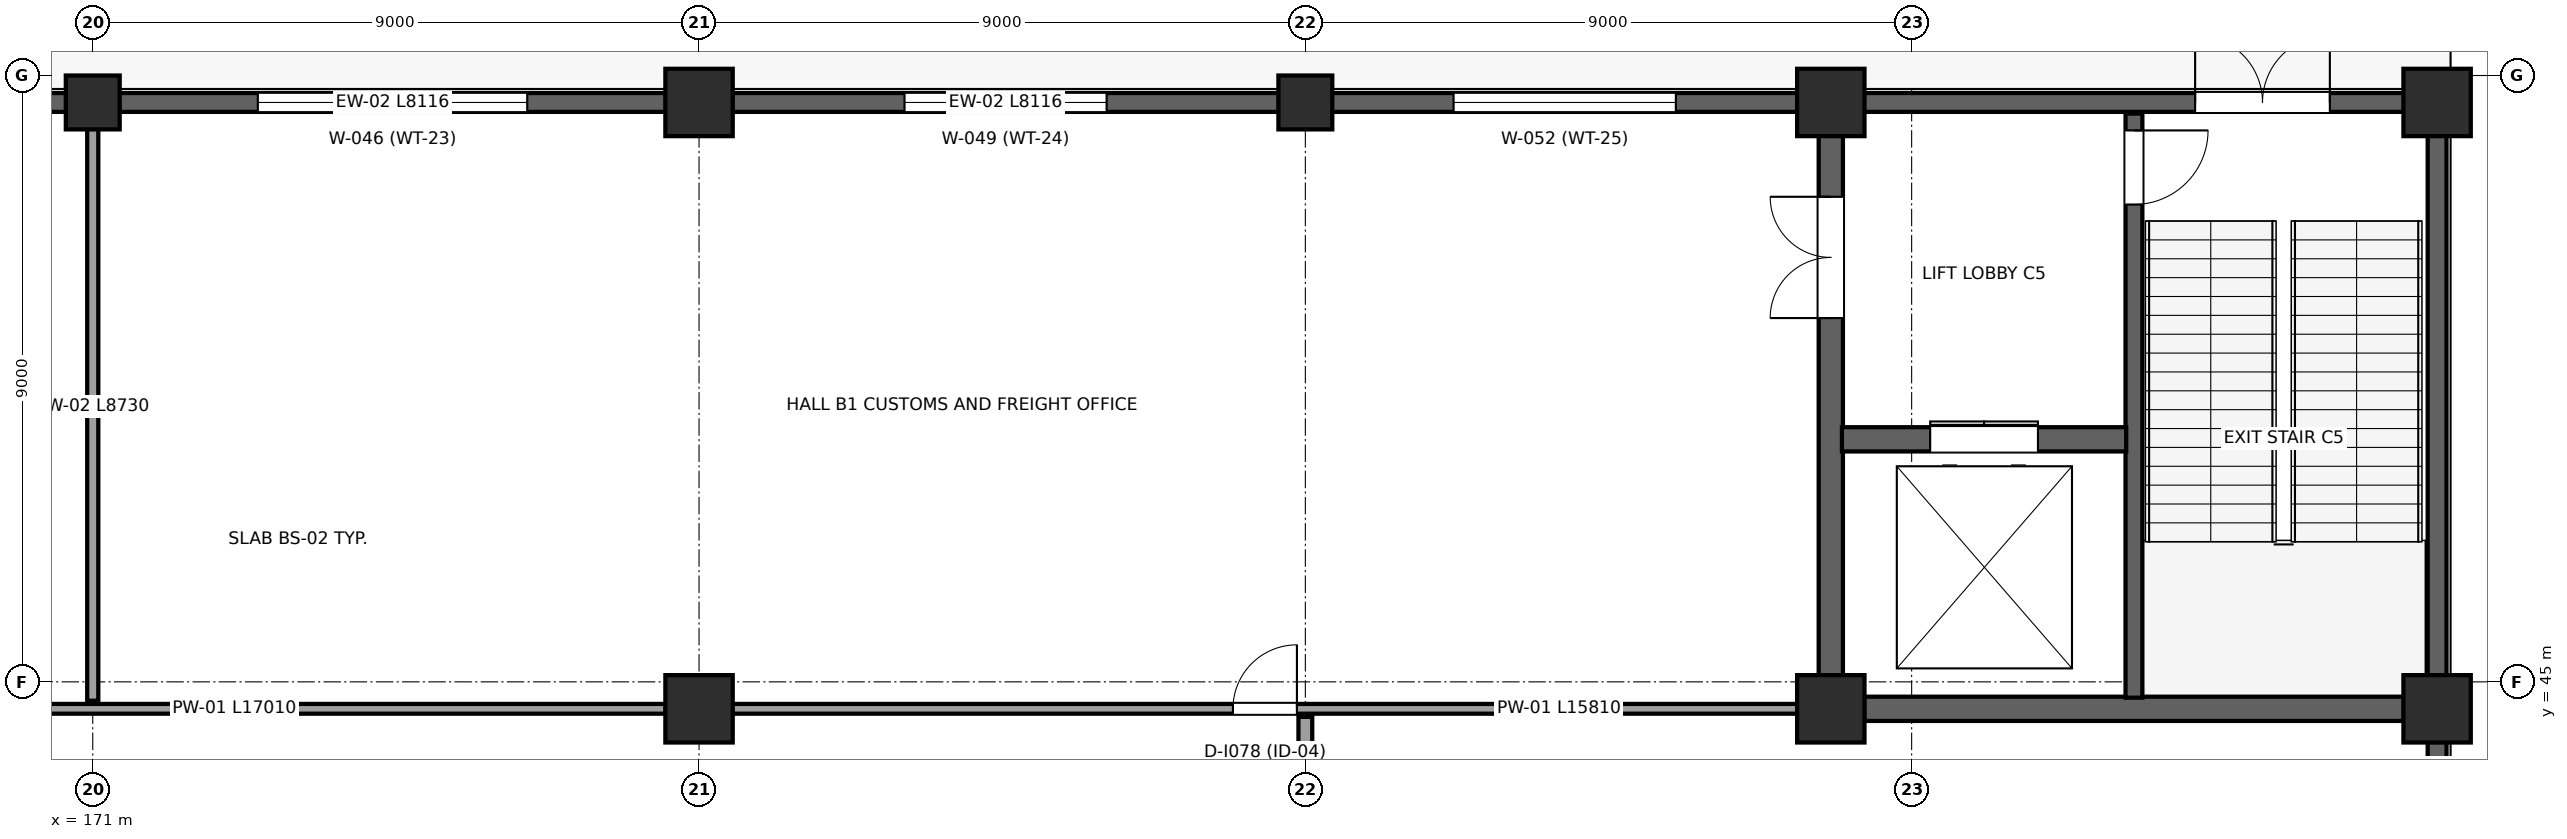
"""IFC4 building model, lengths in metres.
Left out: names, types, materials, properties, quantities, classifications, styles, units other than length and angle.
Written with IfcOpenShell. Run it as: python <this file> out.ifc"""

import sys

from ifc_helpers import new_model, si_unit, direction, frame, frame_2d, origin, origin_2d, place, context, subcontext, project, spatial, rectangle, extrude, element, fill, save


model = new_model("IFC4")
c1 = context("Model", 3, precision=1e-05, world=origin(), true_north=direction((0.0, 1.0)))
c2 = subcontext(c1, "Body", "Model", "MODEL_VIEW")
j1 = project(units=[si_unit("LENGTHUNIT", "METRE"), si_unit("PLANEANGLEUNIT", "RADIAN")], contexts=[c1])
p1 = place(None, origin())
s1 = spatial("IfcSite", under=j1, at=p1, CompositionType="ELEMENT")
p2 = place(p1, origin())
s2 = spatial("IfcBuilding", under=s1, at=p2, CompositionType="ELEMENT")
p3 = place(p2, origin())
s3 = spatial("IfcBuildingStorey", under=s2, at=p3, CompositionType="ELEMENT", Elevation=0.0)
for number, where, z_axis, x_axis in (
    (1, (180.0, 44.6, 0.0), (0.0, 0.0, 1.0), (1.0, 0.0, 0.0)),
    (2, (180.0, 53.6, 0.0), (0.0, 0.0, 1.0), (1.0, 0.0, 0.0)),
    (3, (196.8, 44.6, 0.0), (0.0, 0.0, 1.0), (1.0, 0.0, 0.0)),
    (4, (196.8, 53.6, 0.0), (0.0, 0.0, 1.0), (1.0, 0.0, 0.0)),
    (5, (205.8, 44.6, 0.0), (0.0, 0.0, 1.0), (1.0, 0.0, 0.0)),
    (6, (205.8, 53.6, 0.0), (0.0, 0.0, 1.0), (1.0, 0.0, 0.0)),
):
    element("IfcColumn", number, at=place(p3, frame(where, z_axis=z_axis, x_axis=x_axis)), inside=s3, PredefinedType="COLUMN", context=c2, shape_type="SweptSolid", body=[
        extrude(rectangle(XDim=1.0, YDim=1.0, at=origin_2d()), origin(), (0.0, 0.0, 1.0), 6.0),
    ])
for number, where, z_axis, x_axis in (
    (7, (171.0, 53.6, 0.0), (0.0, 0.0, 1.0), (1.0, 0.0, 0.0)),
    (8, (189.0, 53.6, 0.0), (0.0, 0.0, 1.0), (1.0, 0.0, 0.0)),
):
    element("IfcColumn", number, at=place(p3, frame(where, z_axis=z_axis, x_axis=x_axis)), inside=s3, PredefinedType="COLUMN", context=c2, shape_type="SweptSolid", body=[
        extrude(rectangle(XDim=0.8, YDim=0.8, at=origin_2d()), origin(), (0.0, 0.0, 1.0), 6.0),
    ])
p4 = place(p3, frame((162.492, 53.6, 0.0), z_axis=(0.0, 0.0, 1.0), x_axis=(1.0, 0.0, 0.0)))
e9 = element("IfcWall", 9, at=p4, inside=s3, PredefinedType="STANDARD", context=c2, shape_type="SweptSolid", body=[
    extrude(rectangle(XDim=8.116, YDim=0.28, at=frame_2d((4.058, 0.0))), origin(), (0.0, 0.0, 1.0), 5.75),
])
p5 = place(p4, frame((2.858, 0.0, 0.0)))
e10 = element("IfcOpeningElement", 10, at=p5, cuts=e9, PredefinedType="OPENING", context=c2, shape_type="SweptSolid", body=[
    extrude(rectangle(XDim=2.4, YDim=2.6, at=frame_2d((1.2, 1.3))), frame((0.0, 0.15, 0.0), z_axis=(0.0, -1.0, 0.0), x_axis=(1.0, 0.0, 0.0)), (0.0, 0.0, 1.0), 0.3),
])
p6 = place(p3, frame((171.392, 53.6, 0.0), z_axis=(0.0, 0.0, 1.0), x_axis=(1.0, 0.0, 0.0)))
e11 = element("IfcWall", 11, at=p6, inside=s3, PredefinedType="STANDARD", context=c2, shape_type="SweptSolid", body=[
    extrude(rectangle(XDim=8.116, YDim=0.28, at=frame_2d((4.058, 0.0))), origin(), (0.0, 0.0, 1.0), 5.75),
])
p7 = place(p6, frame((2.058, 0.0, 2.6)))
e12 = element("IfcOpeningElement", 12, at=p7, cuts=e11, PredefinedType="OPENING", context=c2, shape_type="SweptSolid", body=[
    extrude(rectangle(XDim=4.0, YDim=1.25, at=frame_2d((2.0, 0.625))), frame((0.0, 0.15, 0.0), z_axis=(0.0, -1.0, 0.0), x_axis=(1.0, 0.0, 0.0)), (0.0, 0.0, 1.0), 0.3),
])
p8 = place(p3, frame((180.492, 53.6, 0.0), z_axis=(0.0, 0.0, 1.0), x_axis=(1.0, 0.0, 0.0)))
e13 = element("IfcWall", 13, at=p8, inside=s3, PredefinedType="STANDARD", context=c2, shape_type="SweptSolid", body=[
    extrude(rectangle(XDim=8.116, YDim=0.28, at=frame_2d((4.058, 0.0))), origin(), (0.0, 0.0, 1.0), 5.75),
])
p9 = place(p8, frame((2.558, 0.0, 2.6)))
e14 = element("IfcOpeningElement", 14, at=p9, cuts=e13, PredefinedType="OPENING", context=c2, shape_type="SweptSolid", body=[
    extrude(rectangle(XDim=3.0, YDim=1.45, at=frame_2d((1.5, 0.725))), frame((0.0, 0.15, 0.0), z_axis=(0.0, -1.0, 0.0), x_axis=(1.0, 0.0, 0.0)), (0.0, 0.0, 1.0), 0.3),
])
p10 = place(p3, frame((189.392, 53.6, 0.0), z_axis=(0.0, 0.0, 1.0), x_axis=(1.0, 0.0, 0.0)))
e15 = element("IfcWall", 15, at=p10, inside=s3, PredefinedType="STANDARD", context=c2, shape_type="SweptSolid", body=[
    extrude(rectangle(XDim=6.916, YDim=0.28, at=frame_2d((3.458, 0.0))), origin(), (0.0, 0.0, 1.0), 5.75),
])
p11 = place(p10, frame((1.808, 0.0, 2.6)))
e16 = element("IfcOpeningElement", 16, at=p11, cuts=e15, PredefinedType="OPENING", context=c2, shape_type="SweptSolid", body=[
    extrude(rectangle(XDim=3.3, YDim=1.45, at=frame_2d((1.65, 0.725))), frame((0.0, 0.15, 0.0), z_axis=(0.0, -1.0, 0.0), x_axis=(1.0, 0.0, 0.0)), (0.0, 0.0, 1.0), 0.3),
])
p12 = place(p3, frame((197.292, 53.6, 0.0), z_axis=(0.0, 0.0, 1.0), x_axis=(1.0, 0.0, 0.0)))
e17 = element("IfcWall", 17, at=p12, inside=s3, PredefinedType="STANDARD", context=c2, shape_type="SweptSolid", body=[
    extrude(rectangle(XDim=8.016, YDim=0.28, at=frame_2d((4.008, 0.0))), origin(), (0.0, 0.0, 1.0), 5.75),
])
p13 = place(p12, frame((4.916, 0.0, 0.0)))
e18 = element("IfcOpeningElement", 18, at=p13, cuts=e17, PredefinedType="OPENING", context=c2, shape_type="SweptSolid", body=[
    extrude(rectangle(XDim=2.0, YDim=2.4, at=frame_2d((1.0, 1.2))), frame((0.0, 0.15, 0.0), z_axis=(0.0, -1.0, 0.0), x_axis=(1.0, 0.0, 0.0)), (0.0, 0.0, 1.0), 0.3),
])
p14 = place(p3, frame((205.8, 44.108, 0.0), z_axis=(0.0, 0.0, 1.0), x_axis=(0.0, -1.0, 0.0)))
e19 = element("IfcWall", 19, at=p14, inside=s3, PredefinedType="STANDARD", context=c2, shape_type="SweptSolid", body=[
    extrude(rectangle(XDim=7.616, YDim=0.28, at=frame_2d((3.808, 0.0))), origin(), (0.0, 0.0, 1.0), 5.75),
])
p15 = place(p14, frame((1.108, 0.0, 0.0)))
e20 = element("IfcOpeningElement", 20, at=p15, cuts=e19, PredefinedType="OPENING", context=c2, shape_type="SweptSolid", body=[
    extrude(rectangle(XDim=5.4, YDim=4.8, at=frame_2d((2.7, 2.4))), frame((0.0, 0.15, 0.0), z_axis=(0.0, -1.0, 0.0), x_axis=(1.0, 0.0, 0.0)), (0.0, 0.0, 1.0), 0.3),
])
p16 = place(p3, frame((205.8, 53.108, 0.0), z_axis=(0.0, 0.0, 1.0), x_axis=(0.0, -1.0, 0.0)))
e21 = element("IfcWall", 21, at=p16, inside=s3, PredefinedType="STANDARD", context=c2, shape_type="SweptSolid", body=[
    extrude(rectangle(XDim=8.016, YDim=0.28, at=frame_2d((4.008, 0.0))), origin(), (0.0, 0.0, 1.0), 5.75),
])
p17 = place(p3, frame((196.8, 45.095, 0.0), z_axis=(0.0, 0.0, 1.0), x_axis=(0.0, 1.0, 0.0)))
e22 = element("IfcWall", 22, at=p17, inside=s3, PredefinedType="SHEAR", context=c2, shape_type="SweptSolid", body=[
    extrude(rectangle(XDim=8.01, YDim=0.36, at=frame_2d((4.005, 0.0))), origin(), (0.0, 0.0, 1.0), 5.75),
])
p18 = place(p17, frame((5.305, 0.0, 0.0)))
e23 = element("IfcOpeningElement", 23, at=p18, cuts=e22, PredefinedType="OPENING", context=c2, shape_type="SweptSolid", body=[
    extrude(rectangle(XDim=1.8, YDim=2.3, at=frame_2d((0.9, 1.15))), frame((0.0, 0.19, 0.0), z_axis=(0.0, -1.0, 0.0), x_axis=(1.0, 0.0, 0.0)), (0.0, 0.0, 1.0), 0.38),
])
p19 = place(p3, frame((197.295, 44.6, 0.0), z_axis=(0.0, 0.0, 1.0), x_axis=(1.0, 0.0, 0.0)))
e24 = element("IfcWall", 24, at=p19, inside=s3, PredefinedType="SHEAR", context=c2, shape_type="SweptSolid", body=[
    extrude(rectangle(XDim=8.01, YDim=0.36, at=frame_2d((4.005, 0.0))), origin(), (0.0, 0.0, 1.0), 5.75),
])
p20 = place(p3, frame((201.3, 53.435, 0.0), z_axis=(0.0, 0.0, 1.0), x_axis=(0.0, -1.0, 0.0)))
e25 = element("IfcWall", 25, at=p20, inside=s3, PredefinedType="SHEAR", context=c2, shape_type="SweptSolid", body=[
    extrude(rectangle(XDim=8.67, YDim=0.25, at=frame_2d((4.335, 0.0))), origin(), (0.0, 0.0, 1.0), 5.75),
])
p21 = place(p20, frame((0.25, 0.0, 0.0)))
e26 = element("IfcOpeningElement", 26, at=p21, cuts=e25, PredefinedType="OPENING", context=c2, shape_type="SweptSolid", body=[
    extrude(rectangle(XDim=1.1, YDim=2.2, at=frame_2d((0.55, 1.1))), frame((0.0, 0.135, 0.0), z_axis=(0.0, -1.0, 0.0), x_axis=(1.0, 0.0, 0.0)), (0.0, 0.0, 1.0), 0.27),
])
p22 = place(p3, frame((196.965, 48.6, 0.0), z_axis=(0.0, 0.0, 1.0), x_axis=(1.0, 0.0, 0.0)))
e27 = element("IfcWall", 27, at=p22, inside=s3, PredefinedType="SHEAR", context=c2, shape_type="SweptSolid", body=[
    extrude(rectangle(XDim=4.22, YDim=0.36, at=frame_2d((2.11, 0.0))), origin(), (0.0, 0.0, 1.0), 5.75),
])
p23 = place(p22, frame((1.31, 0.0, 0.0)))
e28 = element("IfcOpeningElement", 28, at=p23, cuts=e27, PredefinedType="OPENING", context=c2, shape_type="SweptSolid", body=[
    extrude(rectangle(XDim=1.6, YDim=2.4, at=frame_2d((0.8, 1.2))), frame((0.0, 0.19, 0.0), z_axis=(0.0, -1.0, 0.0), x_axis=(1.0, 0.0, 0.0)), (0.0, 0.0, 1.0), 0.38),
])
p24 = place(p3, frame((189.0, 36.15, 0.0), z_axis=(0.0, 0.0, 1.0), x_axis=(0.0, 1.0, 0.0)))
e29 = element("IfcWall", 29, at=p24, inside=s3, PredefinedType="PARTITIONING", context=c2, shape_type="SweptSolid", body=[
    extrude(rectangle(XDim=8.33, YDim=0.205, at=frame_2d((4.165, 0.0))), origin(), (0.0, 0.0, 1.0), 4.65),
])
p25 = place(p3, frame((162.495, 44.6, 0.0), z_axis=(0.0, 0.0, 1.0), x_axis=(1.0, 0.0, 0.0)))
e30 = element("IfcWall", 30, at=p25, inside=s3, PredefinedType="PARTITIONING", context=c2, shape_type="SweptSolid", body=[
    extrude(rectangle(XDim=17.01, YDim=0.145, at=frame_2d((8.505, 0.0))), origin(), (0.0, 0.0, 1.0), 4.65),
])
p26 = place(p25, frame((2.8, 0.0, 0.0)))
e31 = element("IfcOpeningElement", 31, at=p26, cuts=e30, PredefinedType="OPENING", context=c2, shape_type="SweptSolid", body=[
    extrude(rectangle(XDim=1.05, YDim=2.18, at=frame_2d((0.525, 1.09))), frame((0.0, 0.083, 0.0), z_axis=(0.0, -1.0, 0.0), x_axis=(1.0, 0.0, 0.0)), (0.0, 0.0, 1.0), 0.165),
])
p27 = place(p3, frame((180.495, 44.6, 0.0), z_axis=(0.0, 0.0, 1.0), x_axis=(1.0, 0.0, 0.0)))
e32 = element("IfcWall", 32, at=p27, inside=s3, PredefinedType="PARTITIONING", context=c2, shape_type="SweptSolid", body=[
    extrude(rectangle(XDim=15.81, YDim=0.145, at=frame_2d((7.905, 0.0))), origin(), (0.0, 0.0, 1.0), 4.65),
])
p28 = place(p27, frame((7.43, 0.0, 0.0)))
e33 = element("IfcOpeningElement", 33, at=p28, cuts=e32, PredefinedType="OPENING", context=c2, shape_type="SweptSolid", body=[
    extrude(rectangle(XDim=0.95, YDim=2.12, at=frame_2d((0.475, 1.06))), frame((0.0, 0.083, 0.0), z_axis=(0.0, -1.0, 0.0), x_axis=(1.0, 0.0, 0.0)), (0.0, 0.0, 1.0), 0.165),
])
p29 = place(p3, frame((171.0, 44.72, 0.0), z_axis=(0.0, 0.0, 1.0), x_axis=(0.0, 1.0, 0.0)))
e34 = element("IfcWall", 34, at=p29, inside=s3, PredefinedType="PARTITIONING", context=c2, shape_type="SweptSolid", body=[
    extrude(rectangle(XDim=8.73, YDim=0.165, at=frame_2d((4.365, 0.0))), origin(), (0.0, 0.0, 1.0), 4.65),
])
p30 = place(p7, origin())
e35 = element("IfcWindow", 35, at=p30, inside=s3, PartitioningType="SINGLE_PANEL", PredefinedType="WINDOW", context=c2, shape_type="SweptSolid", body=[
    extrude(rectangle(XDim=4.0, YDim=1.25, at=frame_2d((2.0, 0.625))), frame((0.0, 0.03, 0.0), z_axis=(0.0, -1.0, 0.0), x_axis=(1.0, 0.0, 0.0)), (0.0, 0.0, 1.0), 0.06),
])
fill(e12, e35)
p31 = place(p9, origin())
e36 = element("IfcWindow", 36, at=p31, inside=s3, PartitioningType="SINGLE_PANEL", PredefinedType="WINDOW", context=c2, shape_type="SweptSolid", body=[
    extrude(rectangle(XDim=3.0, YDim=1.45, at=frame_2d((1.5, 0.725))), frame((0.0, 0.03, 0.0), z_axis=(0.0, -1.0, 0.0), x_axis=(1.0, 0.0, 0.0)), (0.0, 0.0, 1.0), 0.06),
])
fill(e14, e36)
p32 = place(p11, origin())
e37 = element("IfcWindow", 37, at=p32, inside=s3, PartitioningType="SINGLE_PANEL", PredefinedType="WINDOW", context=c2, shape_type="SweptSolid", body=[
    extrude(rectangle(XDim=3.3, YDim=1.45, at=frame_2d((1.65, 0.725))), frame((0.0, 0.03, 0.0), z_axis=(0.0, -1.0, 0.0), x_axis=(1.0, 0.0, 0.0)), (0.0, 0.0, 1.0), 0.06),
])
fill(e16, e37)
p33 = place(p13, origin())
e38 = element("IfcDoor", 38, at=p33, inside=s3, OperationType="DOUBLE_DOOR_SINGLE_SWING", PredefinedType="DOOR", context=c2, shape_type="SweptSolid", body=[
    extrude(rectangle(XDim=2.0, YDim=2.4, at=frame_2d((1.0, 1.2))), frame((0.0, 0.025, 0.0), z_axis=(0.0, -1.0, 0.0), x_axis=(1.0, 0.0, 0.0)), (0.0, 0.0, 1.0), 0.05),
])
fill(e18, e38)
p34 = place(p21, origin())
e39 = element("IfcDoor", 39, at=p34, inside=s3, OperationType="SINGLE_SWING_LEFT", PredefinedType="DOOR", context=c2, shape_type="SweptSolid", body=[
    extrude(rectangle(XDim=1.1, YDim=2.2, at=frame_2d((0.55, 1.1))), frame((0.0, 0.025, 0.0), z_axis=(0.0, -1.0, 0.0), x_axis=(1.0, 0.0, 0.0)), (0.0, 0.0, 1.0), 0.05),
])
fill(e26, e39)
p35 = place(p23, origin())
e40 = element("IfcDoor", 40, at=p35, inside=s3, OperationType="DOUBLE_DOOR_SLIDING", PredefinedType="DOOR", context=c2, shape_type="SweptSolid", body=[
    extrude(rectangle(XDim=1.6, YDim=2.4, at=frame_2d((0.8, 1.2))), frame((0.0, 0.025, 0.0), z_axis=(0.0, -1.0, 0.0), x_axis=(1.0, 0.0, 0.0)), (0.0, 0.0, 1.0), 0.05),
])
fill(e28, e40)
p36 = place(p18, origin())
e41 = element("IfcDoor", 41, at=p36, inside=s3, OperationType="DOUBLE_DOOR_SINGLE_SWING", PredefinedType="DOOR", context=c2, shape_type="SweptSolid", body=[
    extrude(rectangle(XDim=1.8, YDim=2.3, at=frame_2d((0.9, 1.15))), frame((0.0, 0.025, 0.0), z_axis=(0.0, -1.0, 0.0), x_axis=(1.0, 0.0, 0.0)), (0.0, 0.0, 1.0), 0.05),
])
fill(e23, e41)
p37 = place(p28, origin())
e42 = element("IfcDoor", 42, at=p37, inside=s3, OperationType="SINGLE_SWING_RIGHT", PredefinedType="DOOR", context=c2, shape_type="SweptSolid", body=[
    extrude(rectangle(XDim=0.95, YDim=2.12, at=frame_2d((0.475, 1.06))), frame((0.0, 0.025, 0.0), z_axis=(0.0, -1.0, 0.0), x_axis=(1.0, 0.0, 0.0)), (0.0, 0.0, 1.0), 0.05),
])
fill(e33, e42)
save(model, sys.argv[1])
